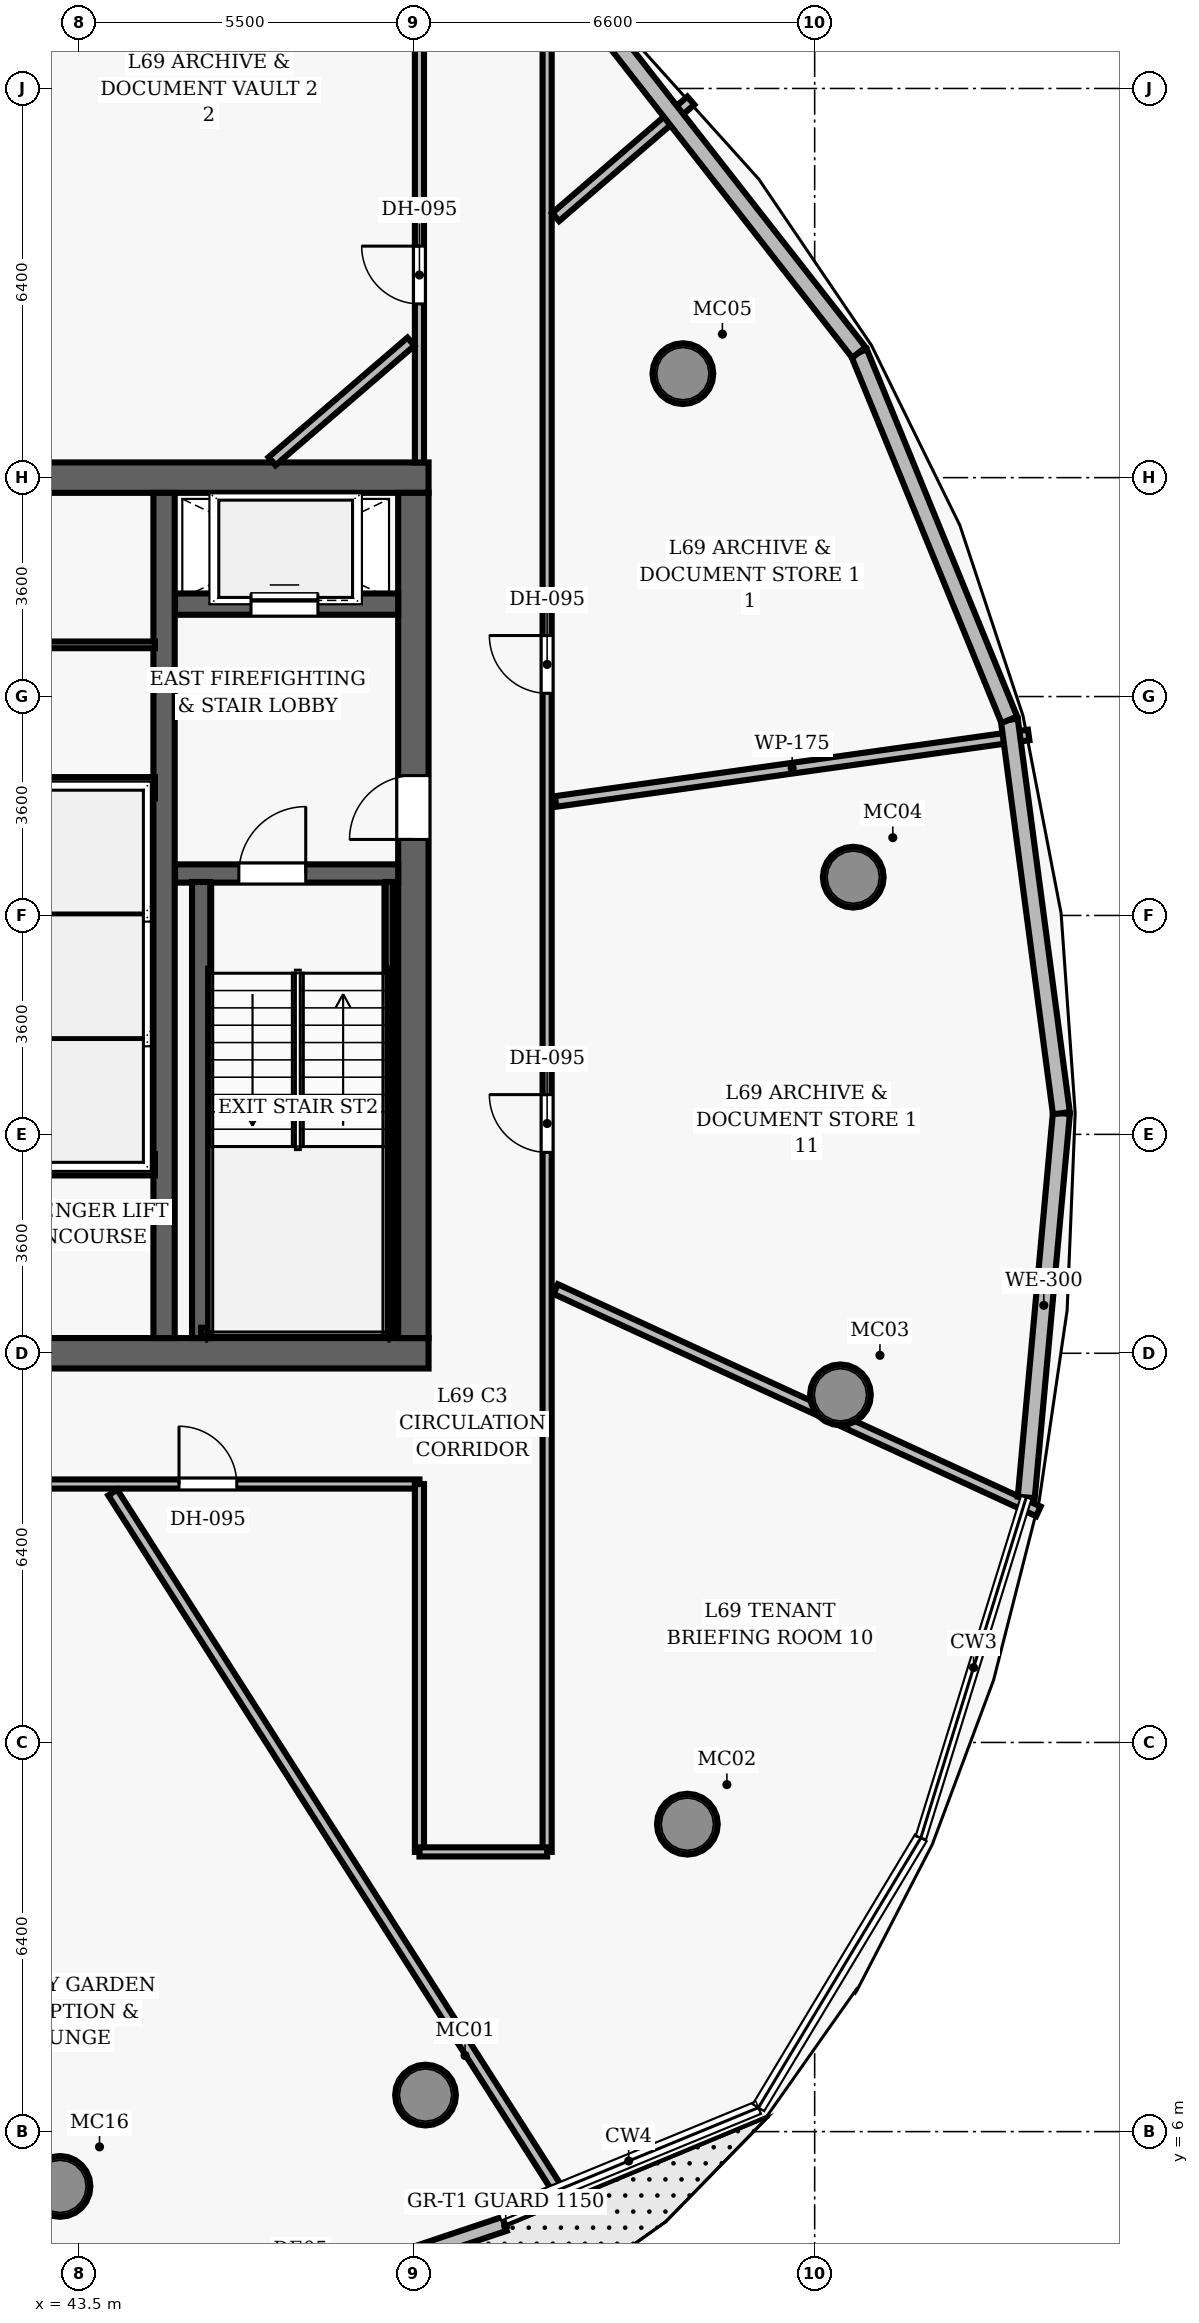
"""IFC4 building model, lengths in metres.
Left out: names, types, materials, properties, quantities, classifications, styles, units other than length and angle.
Written with IfcOpenShell. Run it as: python <this file> out.ifc"""

import sys

from ifc_helpers import new_model, si_unit, direction, frame, frame_2d, origin, origin_2d, place, context, subcontext, project, spatial, rectangle, hollow_circle, extrude, element, fill, save


model = new_model("IFC4")
c1 = context("Model", 3, precision=1e-05, world=origin(), true_north=direction((0.0, 1.0)))
c2 = subcontext(c1, "Body", "Model", "MODEL_VIEW")
j1 = project(units=[si_unit("LENGTHUNIT", "METRE"), si_unit("PLANEANGLEUNIT", "RADIAN")], contexts=[c1])
p1 = place(None, origin())
s1 = spatial("IfcSite", under=j1, at=p1, CompositionType="ELEMENT")
p2 = place(p1, origin())
s2 = spatial("IfcBuilding", under=s1, at=p2, CompositionType="ELEMENT")
p3 = place(p2, frame((0.0, 0.0, 272.85)))
s3 = spatial("IfcBuildingStorey", under=s2, at=p3, CompositionType="ELEMENT", Elevation=272.85)
p4 = place(p3, frame((26.75, 18.8, 0.0), z_axis=(0.0, 0.0, 1.0), x_axis=(1.0, 0.0, 0.0)))
e1 = element("IfcWall", 1, at=p4, inside=s3, PredefinedType="SHEAR", context=c2, shape_type="SweptSolid", body=[
    extrude(rectangle(XDim=22.5, YDim=0.5, at=frame_2d((11.25, 0.0))), origin(), (0.0, 0.0, 1.0), 3.85),
])
p5 = place(p4, frame((14.47, 0.0, 0.0)))
e2 = element("IfcOpeningElement", 2, at=p5, cuts=e1, PredefinedType="OPENING", context=c2, shape_type="SweptSolid", body=[
    extrude(rectangle(XDim=1.05, YDim=2.15, at=frame_2d((0.525, 1.075))), frame((0.0, 0.26, 0.0), z_axis=(0.0, -1.0, 0.0), x_axis=(1.0, 0.0, 0.0)), (0.0, 0.0, 1.0), 0.52),
])
p6 = place(p3, frame((26.75, 33.2, 0.0), z_axis=(0.0, 0.0, 1.0), x_axis=(1.0, 0.0, 0.0)))
e3 = element("IfcWall", 3, at=p6, inside=s3, PredefinedType="SHEAR", context=c2, shape_type="SweptSolid", body=[
    extrude(rectangle(XDim=22.5, YDim=0.5, at=frame_2d((11.25, 0.0))), origin(), (0.0, 0.0, 1.0), 3.85),
])
p7 = place(p3, frame((49.0, 19.05, 0.0), z_axis=(0.0, 0.0, 1.0), x_axis=(0.0, 1.0, 0.0)))
e4 = element("IfcWall", 4, at=p7, inside=s3, PredefinedType="SHEAR", context=c2, shape_type="SweptSolid", body=[
    extrude(rectangle(XDim=13.9, YDim=0.5, at=frame_2d((6.95, 0.0))), origin(), (0.0, 0.0, 1.0), 3.85),
])
p8 = place(p7, frame((8.2, 0.0, 0.0)))
e5 = element("IfcOpeningElement", 5, at=p8, cuts=e4, PredefinedType="OPENING", context=c2, shape_type="SweptSolid", body=[
    extrude(rectangle(XDim=1.05, YDim=2.15, at=frame_2d((0.525, 1.075))), frame((0.0, 0.26, 0.0), z_axis=(0.0, -1.0, 0.0), x_axis=(1.0, 0.0, 0.0)), (0.0, 0.0, 1.0), 0.52),
])
p9 = place(p3, frame((44.9, 19.05, 0.0), z_axis=(0.0, 0.0, 1.0), x_axis=(0.0, 1.0, 0.0)))
e6 = element("IfcWall", 6, at=p9, inside=s3, PredefinedType="SHEAR", context=c2, shape_type="SweptSolid", body=[
    extrude(rectangle(XDim=13.9, YDim=0.35, at=frame_2d((6.95, 0.0))), origin(), (0.0, 0.0, 1.0), 3.85),
])
for number, where, z_axis, x_axis in (
    (7, (49.2, 6.601, 0.0), (0.0, 0.0, 1.0), (1.0, 0.0, 0.0)),
    (8, (53.506, 11.056, 0.0), (0.0, 0.0, 1.0), (1.0, 0.0, 0.0)),
    (9, (56.024, 18.116, 0.0), (0.0, 0.0, 1.0), (1.0, 0.0, 0.0)),
    (10, (56.235, 26.629, 0.0), (0.0, 0.0, 1.0), (1.0, 0.0, 0.0)),
    (11, (53.433, 34.91, 0.0), (0.0, 0.0, 1.0), (1.0, 0.0, 0.0)),
    (12, (43.188, 5.099, 0.0), (0.0, 0.0, 1.0), (1.0, 0.0, 0.0)),
):
    element("IfcColumn", number, at=place(p3, frame(where, z_axis=z_axis, x_axis=x_axis)), inside=s3, PredefinedType="COLUMN", context=c2, shape_type="SweptSolid", body=[
        extrude(hollow_circle(Radius=0.5, WallThickness=0.045, at=origin_2d()), origin(), (0.0, 0.0, 1.0), 3.85),
    ])
p10 = place(p3, frame((45.08, 26.69, 0.0), z_axis=(0.0, 0.0, 1.0), x_axis=(1.0, 0.0, 0.0)))
e13 = element("IfcWall", 13, at=p10, inside=s3, PredefinedType="SHEAR", context=c2, shape_type="SweptSolid", body=[
    extrude(rectangle(XDim=3.67, YDim=0.3, at=frame_2d((1.835, 0.0))), origin(), (0.0, 0.0, 1.0), 3.85),
])
p11 = place(p10, frame((1.05, 0.0, 0.0)))
e14 = element("IfcOpeningElement", 14, at=p11, cuts=e13, PredefinedType="OPENING", context=c2, shape_type="SweptSolid", body=[
    extrude(rectangle(XDim=1.1, YDim=2.15, at=frame_2d((0.55, 1.075))), frame((0.0, 0.16, 0.0), z_axis=(0.0, -1.0, 0.0), x_axis=(1.0, 0.0, 0.0)), (0.0, 0.0, 1.0), 0.32),
])
p12 = place(p3, frame((45.51, 19.05, 0.0), z_axis=(0.0, 0.0, 1.0), x_axis=(0.0, 1.0, 0.0)))
e15 = element("IfcWall", 15, at=p12, inside=s3, PredefinedType="SHEAR", context=c2, shape_type="SweptSolid", body=[
    extrude(rectangle(XDim=7.5, YDim=0.3, at=frame_2d((3.75, 0.0))), origin(), (0.0, 0.0, 1.0), 3.85),
])
p13 = place(p3, frame((48.605, 19.1, 0.0), z_axis=(0.0, 0.0, 1.0), x_axis=(0.0, 1.0, 0.0)))
e16 = element("IfcWall", 16, at=p13, inside=s3, PredefinedType="SHEAR", context=c2, shape_type="SweptSolid", body=[
    extrude(rectangle(XDim=7.45, YDim=0.12, at=frame_2d((3.725, 0.0))), origin(), (0.0, 0.0, 1.0), 3.85),
])
p14 = place(p3, frame((45.51, 19.16, 0.0), z_axis=(0.0, 0.0, 1.0), x_axis=(1.0, 0.0, 0.0)))
e17 = element("IfcWall", 17, at=p14, inside=s3, PredefinedType="SHEAR", context=c2, shape_type="SweptSolid", body=[
    extrude(rectangle(XDim=3.095, YDim=0.12, at=frame_2d((1.547, 0.0))), origin(), (0.0, 0.0, 1.0), 3.85),
])
p15 = place(p3, frame((45.08, 31.12, 0.0), z_axis=(0.0, 0.0, 1.0), x_axis=(1.0, 0.0, 0.0)))
e18 = element("IfcWall", 18, at=p15, inside=s3, PredefinedType="SHEAR", context=c2, shape_type="SweptSolid", body=[
    extrude(rectangle(XDim=3.67, YDim=0.35, at=frame_2d((1.835, 0.0))), origin(), (0.0, 0.0, 1.0), 3.04),
])
p16 = place(p15, frame((1.25, 0.0, 0.0)))
e19 = element("IfcOpeningElement", 19, at=p16, cuts=e18, PredefinedType="OPENING", context=c2, shape_type="SweptSolid", body=[
    extrude(rectangle(XDim=1.1, YDim=2.15, at=frame_2d((0.55, 1.075))), frame((0.0, 0.185, 0.0), z_axis=(0.0, -1.0, 0.0), x_axis=(1.0, 0.0, 0.0)), (0.0, 0.0, 1.0), 0.37),
])
for number, where, z_axis, x_axis in (
    (20, (42.72, 21.9, 0.0), (0.0, 0.0, 1.0), (1.0, 0.0, 0.0)),
    (21, (42.72, 28.1, 0.0), (0.0, 0.0, 1.0), (1.0, 0.0, 0.0)),
):
    element("IfcWall", number, at=place(p3, frame(where, z_axis=z_axis, x_axis=x_axis)), inside=s3, PredefinedType="SHEAR", context=c2, shape_type="SweptSolid", body=[
        extrude(rectangle(XDim=2.03, YDim=0.35, at=frame_2d((1.015, 0.0))), origin(), (0.0, 0.0, 1.0), 3.04),
    ])
p17 = place(p3, frame((42.55, 30.45, 0.0), z_axis=(0.0, 0.0, 1.0), x_axis=(1.0, 0.0, 0.0)))
e22 = element("IfcWall", 22, at=p17, inside=s3, PredefinedType="PARTITIONING", context=c2, shape_type="SweptSolid", body=[
    extrude(rectangle(XDim=2.2, YDim=0.11, at=frame_2d((1.1, 0.0))), origin(), (0.0, 0.0, 1.0), 3.04),
])
p18 = place(p3, frame((26.9, 16.65, 0.0), z_axis=(0.0, 0.0, 1.0), x_axis=(1.0, 0.0, 0.0)))
e23 = element("IfcWall", 23, at=p18, inside=s3, PredefinedType="PARTITIONING", context=c2, shape_type="SweptSolid", body=[
    extrude(rectangle(XDim=22.2, YDim=0.15, at=frame_2d((11.1, 0.0))), origin(), (0.0, 0.0, 1.0), 3.04),
])
p19 = place(p18, frame((9.217, 0.0, 0.0)))
e24 = element("IfcOpeningElement", 24, at=p19, cuts=e23, PredefinedType="OPENING", context=c2, shape_type="SweptSolid", body=[
    extrude(rectangle(XDim=0.95, YDim=2.15, at=frame_2d((0.475, 1.075))), frame((0.0, 0.085, 0.0), z_axis=(0.0, -1.0, 0.0), x_axis=(1.0, 0.0, 0.0)), (0.0, 0.0, 1.0), 0.17),
])
p20 = place(p18, frame((14.636, 0.0, 0.0)))
e25 = element("IfcOpeningElement", 25, at=p20, cuts=e23, PredefinedType="OPENING", context=c2, shape_type="SweptSolid", body=[
    extrude(rectangle(XDim=0.95, YDim=2.15, at=frame_2d((0.475, 1.075))), frame((0.0, 0.085, 0.0), z_axis=(0.0, -1.0, 0.0), x_axis=(1.0, 0.0, 0.0)), (0.0, 0.0, 1.0), 0.17),
])
p21 = place(p18, frame((18.246, 0.0, 0.0)))
e26 = element("IfcOpeningElement", 26, at=p21, cuts=e23, PredefinedType="OPENING", context=c2, shape_type="SweptSolid", body=[
    extrude(rectangle(XDim=0.95, YDim=2.15, at=frame_2d((0.475, 1.075))), frame((0.0, 0.085, 0.0), z_axis=(0.0, -1.0, 0.0), x_axis=(1.0, 0.0, 0.0)), (0.0, 0.0, 1.0), 0.17),
])
p22 = place(p3, frame((51.2, 10.6, 0.0), z_axis=(0.0, 0.0, 1.0), x_axis=(0.0, 1.0, 0.0)))
e27 = element("IfcWall", 27, at=p22, inside=s3, PredefinedType="PARTITIONING", context=c2, shape_type="SweptSolid", body=[
    extrude(rectangle(XDim=30.126, YDim=0.15, at=frame_2d((15.063, 0.0))), origin(), (0.0, 0.0, 1.0), 3.04),
])
p23 = place(p22, frame((19.053, 0.0, 0.0)))
e28 = element("IfcOpeningElement", 28, at=p23, cuts=e27, PredefinedType="OPENING", context=c2, shape_type="SweptSolid", body=[
    extrude(rectangle(XDim=0.95, YDim=2.15, at=frame_2d((0.475, 1.075))), frame((0.0, 0.085, 0.0), z_axis=(0.0, -1.0, 0.0), x_axis=(1.0, 0.0, 0.0)), (0.0, 0.0, 1.0), 0.17),
])
p24 = place(p22, frame((11.504, 0.0, 0.0)))
e29 = element("IfcOpeningElement", 29, at=p24, cuts=e27, PredefinedType="OPENING", context=c2, shape_type="SweptSolid", body=[
    extrude(rectangle(XDim=0.95, YDim=2.15, at=frame_2d((0.475, 1.075))), frame((0.0, 0.085, 0.0), z_axis=(0.0, -1.0, 0.0), x_axis=(1.0, 0.0, 0.0)), (0.0, 0.0, 1.0), 0.17),
])
p25 = place(p3, frame((49.1, 10.6, 0.0), z_axis=(0.0, 0.0, 1.0), x_axis=(0.0, 1.0, 0.0)))
e30 = element("IfcWall", 30, at=p25, inside=s3, PredefinedType="PARTITIONING", context=c2, shape_type="SweptSolid", body=[
    extrude(rectangle(XDim=6.05, YDim=0.15, at=frame_2d((3.025, 0.0))), origin(), (0.0, 0.0, 1.0), 3.04),
])
p26 = place(p3, frame((49.1, 33.45, 0.0), z_axis=(0.0, 0.0, 1.0), x_axis=(0.0, 1.0, 0.0)))
e31 = element("IfcWall", 31, at=p26, inside=s3, PredefinedType="PARTITIONING", context=c2, shape_type="SweptSolid", body=[
    extrude(rectangle(XDim=7.276, YDim=0.15, at=frame_2d((3.638, 0.0))), origin(), (0.0, 0.0, 1.0), 3.04),
])
p27 = place(p26, frame((2.607, 0.0, 0.0)))
e32 = element("IfcOpeningElement", 32, at=p27, cuts=e31, PredefinedType="OPENING", context=c2, shape_type="SweptSolid", body=[
    extrude(rectangle(XDim=0.95, YDim=2.15, at=frame_2d((0.475, 1.075))), frame((0.0, 0.085, 0.0), z_axis=(0.0, -1.0, 0.0), x_axis=(1.0, 0.0, 0.0)), (0.0, 0.0, 1.0), 0.17),
])
p28 = place(p3, frame((49.1, 10.6, 0.0), z_axis=(0.0, 0.0, 1.0), x_axis=(1.0, 0.0, 0.0)))
e33 = element("IfcWall", 33, at=p28, inside=s3, PredefinedType="PARTITIONING", context=c2, shape_type="SweptSolid", body=[
    extrude(rectangle(XDim=2.1, YDim=0.15, at=frame_2d((1.05, 0.0))), origin(), (0.0, 0.0, 1.0), 3.04),
])
p29 = place(p3, frame((51.34, 27.875, 0.0), z_axis=(0.0, 0.0, 1.0), x_axis=(0.990265214777, 0.139193406464, 0.0)))
e34 = element("IfcWall", 34, at=p29, inside=s3, PredefinedType="PARTITIONING", context=c2, shape_type="SweptSolid", body=[
    extrude(rectangle(XDim=7.856, YDim=0.175, at=frame_2d((3.928, 0.0))), origin(), (0.0, 0.0, 1.0), 3.04),
])
p30 = place(p3, frame((46.676, 33.47, 0.0), z_axis=(0.0, 0.0, 1.0), x_axis=(0.757802183171, 0.652484368534, 0.0)))
e35 = element("IfcWall", 35, at=p30, inside=s3, PredefinedType="PARTITIONING", context=c2, shape_type="SweptSolid", body=[
    extrude(rectangle(XDim=3.014, YDim=0.175, at=frame_2d((1.507, 0.0))), origin(), (0.0, 0.0, 1.0), 3.04),
])
p31 = place(p3, frame((51.34, 37.485, 0.0), z_axis=(0.0, 0.0, 1.0), x_axis=(0.757856805594, 0.652420924109, 0.0)))
e36 = element("IfcWall", 36, at=p31, inside=s3, PredefinedType="PARTITIONING", context=c2, shape_type="SweptSolid", body=[
    extrude(rectangle(XDim=2.934, YDim=0.175, at=frame_2d((1.467, 0.0))), origin(), (0.0, 0.0, 1.0), 3.04),
])
p32 = place(p3, frame((40.219, 33.47, 0.0), z_axis=(0.0, 0.0, 1.0), x_axis=(0.284773538312, 0.958594821537, 0.0)))
e37 = element("IfcWall", 37, at=p32, inside=s3, PredefinedType="PARTITIONING", context=c2, shape_type="SweptSolid", body=[
    extrude(rectangle(XDim=13.282, YDim=0.175, at=frame_2d((6.641, 0.0))), origin(), (0.0, 0.0, 1.0), 3.04),
])
p33 = place(p3, frame((44.056, 16.51, 0.0), z_axis=(0.0, 0.0, 1.0), x_axis=(0.537965618689, -0.842966780549, 0.0)))
e38 = element("IfcWall", 38, at=p33, inside=s3, PredefinedType="PARTITIONING", context=c2, shape_type="SweptSolid", body=[
    extrude(rectangle(XDim=13.689, YDim=0.175, at=frame_2d((6.844, 0.0))), origin(), (0.0, 0.0, 1.0), 3.04),
])
p34 = place(p3, frame((51.34, 19.857, 0.0), z_axis=(0.0, 0.0, 1.0), x_axis=(0.90829671746, -0.41832651488, 0.0)))
e39 = element("IfcWall", 39, at=p34, inside=s3, PredefinedType="PARTITIONING", context=c2, shape_type="SweptSolid", body=[
    extrude(rectangle(XDim=8.741, YDim=0.175, at=frame_2d((4.37, 0.0))), origin(), (0.0, 0.0, 1.0), 3.04),
])
p35 = place(p3, frame((50.498, 4.482, 0.0), z_axis=(0.0, 0.0, 1.0), x_axis=(-0.948279524467, -0.317436518815, 0.0)))
e40 = element("IfcWall", 40, at=p35, inside=s3, PredefinedType="SOLIDWALL", context=c2, shape_type="SweptSolid", body=[
    extrude(rectangle(XDim=9.39, YDim=0.24, at=frame_2d((4.695, 0.0))), origin(), (0.0, 0.0, 1.0), 2.8),
])
p36 = place(p35, frame((2.984, 0.0, 0.0)))
e41 = element("IfcOpeningElement", 41, at=p36, cuts=e40, PredefinedType="OPENING", context=c2, shape_type="SweptSolid", body=[
    extrude(rectangle(XDim=1.1, YDim=2.2, at=frame_2d((0.55, 1.1))), frame((0.0, 0.13, 0.0), z_axis=(0.0, -1.0, 0.0), x_axis=(1.0, 0.0, 0.0)), (0.0, 0.0, 1.0), 0.26),
])
p37 = place(p3, frame((59.658, 22.748, 0.0), z_axis=(0.0, 0.0, 1.0), x_axis=(-0.091149768789, -0.995837195354, 0.0)))
e42 = element("IfcWall", 42, at=p37, inside=s3, PredefinedType="SOLIDWALL", context=c2, shape_type="SweptSolid", body=[
    extrude(rectangle(XDim=6.345, YDim=0.28, at=frame_2d((3.173, 0.0))), origin(), (0.0, 0.0, 1.0), 3.625),
])
p38 = place(p3, frame((58.802, 29.218, 0.0), z_axis=(0.0, 0.0, 1.0), x_axis=(0.131232508408, -0.991351617105, 0.0)))
e43 = element("IfcWall", 43, at=p38, inside=s3, PredefinedType="SOLIDWALL", context=c2, shape_type="SweptSolid", body=[
    extrude(rectangle(XDim=6.526, YDim=0.28, at=frame_2d((3.263, 0.0))), origin(), (0.0, 0.0, 1.0), 3.625),
])
p39 = place(p3, frame((56.328, 35.258, 0.0), z_axis=(0.0, 0.0, 1.0), x_axis=(0.378975080953, -0.92540687701, 0.0)))
e44 = element("IfcWall", 44, at=p39, inside=s3, PredefinedType="SOLIDWALL", context=c2, shape_type="SweptSolid", body=[
    extrude(rectangle(XDim=6.527, YDim=0.28, at=frame_2d((3.264, 0.0))), origin(), (0.0, 0.0, 1.0), 3.625),
])
p40 = place(p3, frame((52.307, 40.399, 0.0), z_axis=(0.0, 0.0, 1.0), x_axis=(0.616072222738, -0.787689670092, 0.0)))
e45 = element("IfcWall", 45, at=p40, inside=s3, PredefinedType="SOLIDWALL", context=c2, shape_type="SweptSolid", body=[
    extrude(rectangle(XDim=6.527, YDim=0.28, at=frame_2d((3.263, 0.0))), origin(), (0.0, 0.0, 1.0), 3.625),
])
p41 = place(p11, origin())
e46 = element("IfcDoor", 46, at=p41, inside=s3, OperationType="SINGLE_SWING_RIGHT", PredefinedType="DOOR", context=c2, shape_type="SweptSolid", body=[
    extrude(rectangle(XDim=1.1, YDim=2.15, at=frame_2d((0.55, 1.075))), frame((0.0, 0.025, 0.0), z_axis=(0.0, -1.0, 0.0), x_axis=(1.0, 0.0, 0.0)), (0.0, 0.0, 1.0), 0.05),
])
fill(e14, e46)
p42 = place(p8, origin())
e47 = element("IfcDoor", 47, at=p42, inside=s3, OperationType="SINGLE_SWING_LEFT", PredefinedType="DOOR", context=c2, shape_type="SweptSolid", body=[
    extrude(rectangle(XDim=1.05, YDim=2.15, at=frame_2d((0.525, 1.075))), frame((0.0, 0.025, 0.0), z_axis=(0.0, -1.0, 0.0), x_axis=(1.0, 0.0, 0.0)), (0.0, 0.0, 1.0), 0.05),
])
fill(e5, e47)
p43 = place(p23, origin())
e48 = element("IfcDoor", 48, at=p43, inside=s3, OperationType="SINGLE_SWING_RIGHT", PredefinedType="DOOR", context=c2, shape_type="SweptSolid", body=[
    extrude(rectangle(XDim=0.95, YDim=2.15, at=frame_2d((0.475, 1.075))), frame((0.0, 0.025, 0.0), z_axis=(0.0, -1.0, 0.0), x_axis=(1.0, 0.0, 0.0)), (0.0, 0.0, 1.0), 0.05),
])
fill(e28, e48)
p44 = place(p27, origin())
e49 = element("IfcDoor", 49, at=p44, inside=s3, OperationType="SINGLE_SWING_RIGHT", PredefinedType="DOOR", context=c2, shape_type="SweptSolid", body=[
    extrude(rectangle(XDim=0.95, YDim=2.15, at=frame_2d((0.475, 1.075))), frame((0.0, 0.025, 0.0), z_axis=(0.0, -1.0, 0.0), x_axis=(1.0, 0.0, 0.0)), (0.0, 0.0, 1.0), 0.05),
])
fill(e32, e49)
p45 = place(p21, origin())
e50 = element("IfcDoor", 50, at=p45, inside=s3, OperationType="SINGLE_SWING_LEFT", PredefinedType="DOOR", context=c2, shape_type="SweptSolid", body=[
    extrude(rectangle(XDim=0.95, YDim=2.15, at=frame_2d((0.475, 1.075))), frame((0.0, 0.025, 0.0), z_axis=(0.0, -1.0, 0.0), x_axis=(1.0, 0.0, 0.0)), (0.0, 0.0, 1.0), 0.05),
])
fill(e26, e50)
p46 = place(p24, origin())
e51 = element("IfcDoor", 51, at=p46, inside=s3, OperationType="SINGLE_SWING_RIGHT", PredefinedType="DOOR", context=c2, shape_type="SweptSolid", body=[
    extrude(rectangle(XDim=0.95, YDim=2.15, at=frame_2d((0.475, 1.075))), frame((0.0, 0.025, 0.0), z_axis=(0.0, -1.0, 0.0), x_axis=(1.0, 0.0, 0.0)), (0.0, 0.0, 1.0), 0.05),
])
fill(e29, e51)
p47 = place(p16, origin())
e52 = element("IfcDoor", 52, at=p47, inside=s3, OperationType="SLIDING_TO_LEFT", PredefinedType="DOOR", context=c2, shape_type="SweptSolid", body=[
    extrude(rectangle(XDim=1.1, YDim=2.15, at=frame_2d((0.55, 1.075))), frame((0.0, 0.025, 0.0), z_axis=(0.0, -1.0, 0.0), x_axis=(1.0, 0.0, 0.0)), (0.0, 0.0, 1.0), 0.05),
])
fill(e19, e52)
save(model, sys.argv[1])
